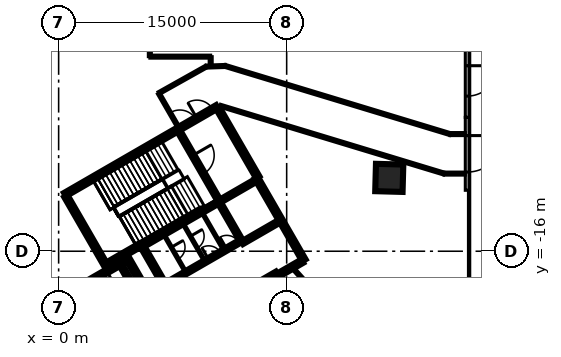
"""IFC4 building model, lengths in metres.
Left out: names, types, materials, properties, quantities, classifications, styles, units other than length and angle.
Written with IfcOpenShell. Run it as: python <this file> out.ifc"""

import sys

from ifc_helpers import new_model, si_unit, direction, frame, frame_2d, origin, origin_2d, place, context, subcontext, project, spatial, rectangle, extrude, element, fill, save


model = new_model("IFC4")
c1 = context("Model", 3, precision=1e-05, world=origin(), true_north=direction((0.0, 1.0)))
c2 = subcontext(c1, "Body", "Model", "MODEL_VIEW")
j1 = project(units=[si_unit("LENGTHUNIT", "METRE"), si_unit("PLANEANGLEUNIT", "RADIAN")], contexts=[c1])
p1 = place(None, origin())
s1 = spatial("IfcSite", under=j1, at=p1, CompositionType="ELEMENT")
p2 = place(p1, origin())
s2 = spatial("IfcBuilding", under=s1, at=p2, CompositionType="ELEMENT")
p3 = place(p2, origin())
s3 = spatial("IfcBuildingStorey", under=s2, at=p3, CompositionType="ELEMENT", Elevation=0.0)
p4 = place(p3, frame((21.749, -11.174, -0.45), z_axis=(0.0, 0.0, 1.0), x_axis=(-0.999628128016, 0.02726913418, 0.0)))
e1 = element("IfcColumn", 1, at=p4, inside=s3, PredefinedType="COLUMN", context=c2, shape_type="SweptSolid", body=[
    extrude(rectangle(XDim=1.8, YDim=1.8, at=origin_2d()), origin(), (0.0, 0.0, 1.0), 5.15),
])
p5 = place(p3, frame((26.875, -7.195, 0.0), z_axis=(0.0, 0.0, 1.0), x_axis=(0.0, -1.0, 0.0)))
e2 = element("IfcWall", 2, at=p5, inside=s3, PredefinedType="SOLIDWALL", context=c2, shape_type="SweptSolid", body=[
    extrude(rectangle(XDim=4.797, YDim=0.25, at=frame_2d((2.398, 0.0))), origin(), (0.0, 0.0, 1.0), 7.1),
])
p6 = place(p5, frame((1.198, 0.0, 0.0)))
e3 = element("IfcOpeningElement", 3, at=p6, cuts=e2, PredefinedType="OPENING", context=c2, shape_type="SweptSolid", body=[
    extrude(rectangle(XDim=2.4, YDim=2.4, at=frame_2d((1.2, 1.2))), frame((0.0, 0.135, 0.0), z_axis=(0.0, -1.0, 0.0), x_axis=(1.0, 0.0, 0.0)), (0.0, 0.0, 1.0), 0.27),
])
p7 = place(p3, frame((26.875, -2.398, 0.0), z_axis=(0.0, 0.0, 1.0), x_axis=(0.0, -1.0, 0.0)))
e4 = element("IfcWall", 4, at=p7, inside=s3, PredefinedType="SOLIDWALL", context=c2, shape_type="SweptSolid", body=[
    extrude(rectangle(XDim=4.796, YDim=0.25, at=frame_2d((2.398, 0.0))), origin(), (0.0, 0.0, 1.0), 7.1),
])
p8 = place(p7, frame((1.398, 0.0, 0.0)))
e5 = element("IfcOpeningElement", 5, at=p8, cuts=e4, PredefinedType="OPENING", context=c2, shape_type="SweptSolid", body=[
    extrude(rectangle(XDim=2.0, YDim=2.7, at=frame_2d((1.0, 1.35))), frame((0.0, 0.135, 0.0), z_axis=(0.0, -1.0, 0.0), x_axis=(1.0, 0.0, 0.0)), (0.0, 0.0, 1.0), 0.27),
])
p9 = place(p3, frame((0.417, -12.273, 0.0), z_axis=(0.0, 0.0, 1.0), x_axis=(0.866021906294, 0.500006057782, 0.0)))
e6 = element("IfcWall", 6, at=p9, inside=s3, PredefinedType="SHEAR", context=c2, shape_type="SweptSolid", body=[
    extrude(rectangle(XDim=11.55, YDim=0.25, at=frame_2d((5.775, 0.0))), origin(), (0.0, 0.0, 1.0), 7.1),
])
p10 = place(p9, frame((10.025, 0.0, 0.0)))
e7 = element("IfcOpeningElement", 7, at=p10, cuts=e6, PredefinedType="OPENING", context=c2, shape_type="SweptSolid", body=[
    extrude(rectangle(XDim=1.2, YDim=2.1, at=frame_2d((0.6, 1.05))), frame((0.0, 0.135, 0.0), z_axis=(0.0, -1.0, 0.0), x_axis=(1.0, 0.0, 0.0)), (0.0, 0.0, 1.0), 0.27),
])
p11 = place(p9, frame((8.725, 0.0, 0.0)))
e8 = element("IfcOpeningElement", 8, at=p11, cuts=e6, PredefinedType="OPENING", context=c2, shape_type="SweptSolid", body=[
    extrude(rectangle(XDim=1.2, YDim=2.1, at=frame_2d((0.6, 1.05))), frame((0.0, 0.135, 0.0), z_axis=(0.0, -1.0, 0.0), x_axis=(1.0, 0.0, 0.0)), (0.0, 0.0, 1.0), 0.27),
])
p12 = place(p3, frame((13.008, -11.181, 0.0), z_axis=(0.0, 0.0, 1.0), x_axis=(0.500004234368, -0.866022959057, 0.0)))
e9 = element("IfcWall", 9, at=p12, inside=s3, PredefinedType="SHEAR", context=c2, shape_type="SweptSolid", body=[
    extrude(rectangle(XDim=6.25, YDim=0.25, at=frame_2d((3.125, 0.0))), origin(), (0.0, 0.0, 1.0), 7.1),
])
p13 = place(p3, frame((3.235, -17.153, 0.0), z_axis=(0.0, 0.0, 1.0), x_axis=(-0.500008851346, 0.866020293397, 0.0)))
e10 = element("IfcWall", 10, at=p13, inside=s3, PredefinedType="SHEAR", context=c2, shape_type="SweptSolid", body=[
    extrude(rectangle(XDim=5.51, YDim=0.25, at=frame_2d((2.755, 0.0))), origin(), (0.0, 0.0, 1.0), 7.1),
])
p14 = place(p3, frame((10.483, -6.606, 0.0), z_axis=(0.0, 0.0, 1.0), x_axis=(0.49999885962, -0.866026062182, 0.0)))
e11 = element("IfcWall", 11, at=p14, inside=s3, PredefinedType="SHEAR", context=c2, shape_type="SweptSolid", body=[
    extrude(rectangle(XDim=5.225, YDim=0.25, at=frame_2d((2.612, 0.0))), origin(), (0.0, 0.0, 1.0), 7.1),
])
p15 = place(p3, frame((7.031, -18.327, 0.0), z_axis=(0.0, 0.0, 1.0), x_axis=(-0.499971222258, 0.866042017984, 0.0)))
e12 = element("IfcWall", 12, at=p15, inside=s3, PredefinedType="SHEAR", context=c2, shape_type="SweptSolid", body=[
    extrude(rectangle(XDim=3.2, YDim=0.25, at=frame_2d((1.6, 0.0))), origin(), (0.0, 0.0, 1.0), 7.1),
])
p16 = place(p3, frame((14.315, -17.644, 0.0), z_axis=(0.0, 0.0, 1.0), x_axis=(0.500023226632, -0.866011993467, 0.0)))
e13 = element("IfcWall", 13, at=p16, inside=s3, PredefinedType="SHEAR", context=c2, shape_type="SweptSolid", body=[
    extrude(rectangle(XDim=2.974, YDim=0.25, at=frame_2d((1.487, 0.0))), origin(), (0.0, 0.0, 1.0), 7.1),
])
p17 = place(p3, frame((1.669, -18.19, 0.0), z_axis=(0.0, 0.0, 1.0), x_axis=(0.866042235819, 0.499970844928, 0.0)))
e14 = element("IfcWall", 14, at=p17, inside=s3, PredefinedType="SHEAR", context=c2, shape_type="SweptSolid", body=[
    extrude(rectangle(XDim=2.865, YDim=0.25, at=frame_2d((1.432, 0.0))), origin(), (0.0, 0.0, 1.0), 7.1),
])
p18 = place(p3, frame((4.414, -16.276, 0.0), z_axis=(0.0, 0.0, 1.0), x_axis=(0.500003324108, -0.866023484601, 0.0)))
e15 = element("IfcWall", 15, at=p18, inside=s3, PredefinedType="SHEAR", context=c2, shape_type="SweptSolid", body=[
    extrude(rectangle(XDim=3.085, YDim=0.25, at=frame_2d((1.542, 0.0))), origin(), (0.0, 0.0, 1.0), 7.1),
])
p19 = place(p3, frame((5.322, -15.619, 0.0), z_axis=(0.0, 0.0, 1.0), x_axis=(-0.866026229868, -0.499998569178, 0.0)))
e16 = element("IfcWall", 16, at=p19, inside=s3, PredefinedType="SHEAR", context=c2, shape_type="SweptSolid", body=[
    extrude(rectangle(XDim=2.449, YDim=0.25, at=frame_2d((1.225, 0.0))), origin(), (0.0, 0.0, 1.0), 7.1),
])
p20 = place(p3, frame((16.025, -16.656, 0.0), z_axis=(0.0, 0.0, 1.0), x_axis=(-0.866016279763, -0.500015802937, 0.0)))
e17 = element("IfcWall", 17, at=p20, inside=s3, PredefinedType="SHEAR", context=c2, shape_type="SweptSolid", body=[
    extrude(rectangle(XDim=1.849, YDim=0.25, at=frame_2d((0.925, 0.0))), origin(), (0.0, 0.0, 1.0), 7.1),
])
p21 = place(p3, frame((4.145, -16.749, 0.0), z_axis=(0.0, 0.0, 1.0), x_axis=(0.866185586049, 0.49972245349, 0.0)))
e18 = element("IfcWall", 18, at=p21, inside=s3, PredefinedType="SHEAR", context=c2, shape_type="SweptSolid", body=[
    extrude(rectangle(XDim=0.344, YDim=0.25, at=frame_2d((0.172, 0.0))), origin(), (0.0, 0.0, 1.0), 7.1),
])
p22 = place(p3, frame((9.052, -20.48, 0.0), z_axis=(0.0, 0.0, 1.0), x_axis=(0.866030299012, 0.499991521122, 0.0)))
e19 = element("IfcWall", 19, at=p22, inside=s3, PredefinedType="SHEAR", context=c2, shape_type="SweptSolid", body=[
    extrude(rectangle(XDim=6.1, YDim=0.2, at=frame_2d((3.05, 0.0))), origin(), (0.0, 0.0, 1.0), 7.1),
])
p23 = place(p22, frame((1.0, 0.0, 0.0)))
e20 = element("IfcOpeningElement", 20, at=p23, cuts=e19, PredefinedType="OPENING", context=c2, shape_type="SweptSolid", body=[
    extrude(rectangle(XDim=1.2, YDim=2.1, at=frame_2d((0.6, 1.05))), frame((0.0, 0.11, 0.0), z_axis=(0.0, -1.0, 0.0), x_axis=(1.0, 0.0, 0.0)), (0.0, 0.0, 1.0), 0.22),
])
p24 = place(p22, frame((4.05, 0.0, 0.0)))
e21 = element("IfcOpeningElement", 21, at=p24, cuts=e19, PredefinedType="OPENING", context=c2, shape_type="SweptSolid", body=[
    extrude(rectangle(XDim=1.2, YDim=2.1, at=frame_2d((0.6, 1.05))), frame((0.0, 0.11, 0.0), z_axis=(0.0, -1.0, 0.0), x_axis=(1.0, 0.0, 0.0)), (0.0, 0.0, 1.0), 0.22),
])
p25 = place(p3, frame((10.538, -12.752, 0.0), z_axis=(0.0, 0.0, 1.0), x_axis=(-0.866038630372, -0.499977090179, 0.0)))
e22 = element("IfcWall", 22, at=p25, inside=s3, PredefinedType="SHEAR", context=c2, shape_type="SweptSolid", body=[
    extrude(rectangle(XDim=5.699, YDim=0.2, at=frame_2d((2.85, 0.0))), origin(), (0.0, 0.0, 1.0), 7.1),
])
p26 = place(p3, frame((7.077, -18.156, 0.0), z_axis=(0.0, 0.0, 1.0), x_axis=(0.866038630372, 0.499977090179, 0.0)))
e23 = element("IfcWall", 23, at=p26, inside=s3, PredefinedType="SHEAR", context=c2, shape_type="SweptSolid", body=[
    extrude(rectangle(XDim=5.699, YDim=0.2, at=frame_2d((2.85, 0.0))), origin(), (0.0, 0.0, 1.0), 7.1),
])
p27 = place(p26, frame((3.224, 0.0, 0.0)))
e24 = element("IfcOpeningElement", 24, at=p27, cuts=e23, PredefinedType="OPENING", context=c2, shape_type="SweptSolid", body=[
    extrude(rectangle(XDim=0.9, YDim=2.1, at=frame_2d((0.45, 1.05))), frame((0.0, 0.11, 0.0), z_axis=(0.0, -1.0, 0.0), x_axis=(1.0, 0.0, 0.0)), (0.0, 0.0, 1.0), 0.22),
])
p28 = place(p26, frame((4.599, 0.0, 0.0)))
e25 = element("IfcOpeningElement", 25, at=p28, cuts=e23, PredefinedType="OPENING", context=c2, shape_type="SweptSolid", body=[
    extrude(rectangle(XDim=0.9, YDim=2.1, at=frame_2d((0.45, 1.05))), frame((0.0, 0.11, 0.0), z_axis=(0.0, -1.0, 0.0), x_axis=(1.0, 0.0, 0.0)), (0.0, 0.0, 1.0), 0.22),
])
p29 = place(p3, frame((7.906, -8.094, 0.0), z_axis=(0.0, 0.0, 1.0), x_axis=(0.500024287448, -0.866011380966, 0.0)))
e26 = element("IfcWall", 26, at=p29, inside=s3, PredefinedType="SHEAR", context=c2, shape_type="SweptSolid", body=[
    extrude(rectangle(XDim=5.251, YDim=0.2, at=frame_2d((2.625, 0.0))), origin(), (0.0, 0.0, 1.0), 7.1),
])
p30 = place(p29, frame((1.849, 0.0, 0.0)))
e27 = element("IfcOpeningElement", 27, at=p30, cuts=e26, PredefinedType="OPENING", context=c2, shape_type="SweptSolid", body=[
    extrude(rectangle(XDim=1.4, YDim=2.1, at=frame_2d((0.7, 1.05))), frame((0.0, 0.11, 0.0), z_axis=(0.0, -1.0, 0.0), x_axis=(1.0, 0.0, 0.0)), (0.0, 0.0, 1.0), 0.22),
])
p31 = place(p3, frame((5.503, -19.352, 0.0), z_axis=(0.0, 0.0, 1.0), x_axis=(-0.499986818241, 0.866033014143, 0.0)))
e28 = element("IfcWall", 28, at=p31, inside=s3, PredefinedType="SHEAR", context=c2, shape_type="SweptSolid", body=[
    extrude(rectangle(XDim=2.798, YDim=0.2, at=frame_2d((1.399, 0.0))), origin(), (0.0, 0.0, 1.0), 7.1),
])
p32 = place(p31, frame((0.949, 0.0, 0.0)))
e29 = element("IfcOpeningElement", 29, at=p32, cuts=e28, PredefinedType="OPENING", context=c2, shape_type="SweptSolid", body=[
    extrude(rectangle(XDim=0.9, YDim=2.1, at=frame_2d((0.45, 1.05))), frame((0.0, 0.11, 0.0), z_axis=(0.0, -1.0, 0.0), x_axis=(1.0, 0.0, 0.0)), (0.0, 0.0, 1.0), 0.22),
])
p33 = place(p3, frame((11.963, -15.22, 0.0), z_axis=(0.0, 0.0, 1.0), x_axis=(-0.500034990121, 0.866005201286, 0.0)))
e30 = element("IfcWall", 30, at=p33, inside=s3, PredefinedType="SHEAR", context=c2, shape_type="SweptSolid", body=[
    extrude(rectangle(XDim=2.75, YDim=0.2, at=frame_2d((1.375, 0.0))), origin(), (0.0, 0.0, 1.0), 7.1),
])
p34 = place(p3, frame((10.587, -12.723, 0.0), z_axis=(0.0, 0.0, 1.0), x_axis=(0.866037306777, 0.499979382845, 0.0)))
e31 = element("IfcWall", 31, at=p34, inside=s3, PredefinedType="SHEAR", context=c2, shape_type="SweptSolid", body=[
    extrude(rectangle(XDim=2.742, YDim=0.2, at=frame_2d((1.371, 0.0))), origin(), (0.0, 0.0, 1.0), 7.1),
])
p35 = place(p34, frame((0.743, 0.0, 0.0)))
e32 = element("IfcOpeningElement", 32, at=p35, cuts=e31, PredefinedType="OPENING", context=c2, shape_type="SweptSolid", body=[
    extrude(rectangle(XDim=1.3, YDim=2.1, at=frame_2d((0.65, 1.05))), frame((0.0, 0.11, 0.0), z_axis=(0.0, -1.0, 0.0), x_axis=(1.0, 0.0, 0.0)), (0.0, 0.0, 1.0), 0.22),
])
p36 = place(p3, frame((14.512, -14.037, 0.0), z_axis=(0.0, 0.0, 1.0), x_axis=(-0.866044696403, -0.499966582715, 0.0)))
e33 = element("IfcWall", 33, at=p36, inside=s3, PredefinedType="SHEAR", context=c2, shape_type="SweptSolid", body=[
    extrude(rectangle(XDim=2.799, YDim=0.2, at=frame_2d((1.399, 0.0))), origin(), (0.0, 0.0, 1.0), 7.1),
])
p37 = place(p3, frame((8.207, -14.214, 0.0), z_axis=(0.0, 0.0, 1.0), x_axis=(0.50002746344, -0.86600954718, 0.0)))
e34 = element("IfcWall", 34, at=p37, inside=s3, PredefinedType="PARTITIONING", context=c2, shape_type="SweptSolid", body=[
    extrude(rectangle(XDim=2.748, YDim=0.15, at=frame_2d((1.374, 0.0))), origin(), (0.0, 0.0, 1.0), 7.1),
])
p38 = place(p37, frame((0.924, 0.0, 0.0)))
e35 = element("IfcOpeningElement", 35, at=p38, cuts=e34, PredefinedType="OPENING", context=c2, shape_type="SweptSolid", body=[
    extrude(rectangle(XDim=0.9, YDim=2.1, at=frame_2d((0.45, 1.05))), frame((0.0, 0.085, 0.0), z_axis=(0.0, -1.0, 0.0), x_axis=(1.0, 0.0, 0.0)), (0.0, 0.0, 1.0), 0.17),
])
p39 = place(p3, frame((9.462, -13.489, 0.0), z_axis=(0.0, 0.0, 1.0), x_axis=(0.499988999718, -0.866031754707, 0.0)))
e36 = element("IfcWall", 36, at=p39, inside=s3, PredefinedType="PARTITIONING", context=c2, shape_type="SweptSolid", body=[
    extrude(rectangle(XDim=2.749, YDim=0.15, at=frame_2d((1.374, 0.0))), origin(), (0.0, 0.0, 1.0), 7.1),
])
p40 = place(p3, frame((6.951, -14.939, 0.0), z_axis=(0.0, 0.0, 1.0), x_axis=(0.499988999718, -0.866031754707, 0.0)))
e37 = element("IfcWall", 37, at=p40, inside=s3, PredefinedType="PARTITIONING", context=c2, shape_type="SweptSolid", body=[
    extrude(rectangle(XDim=2.749, YDim=0.15, at=frame_2d((1.374, 0.0))), origin(), (0.0, 0.0, 1.0), 7.1),
])
p41 = place(p40, frame((0.924, 0.0, 0.0)))
e38 = element("IfcOpeningElement", 38, at=p41, cuts=e37, PredefinedType="OPENING", context=c2, shape_type="SweptSolid", body=[
    extrude(rectangle(XDim=0.9, YDim=2.1, at=frame_2d((0.45, 1.05))), frame((0.0, 0.085, 0.0), z_axis=(0.0, -1.0, 0.0), x_axis=(1.0, 0.0, 0.0)), (0.0, 0.0, 1.0), 0.17),
])
p42 = place(p3, frame((6.584, -5.605, 0.0), z_axis=(0.0, 0.0, 1.0), x_axis=(0.500037327496, -0.866003851672, 0.0)))
e39 = element("IfcWall", 39, at=p42, inside=s3, PredefinedType="PARTITIONING", context=c2, shape_type="SweptSolid", body=[
    extrude(rectangle(XDim=2.506, YDim=0.2, at=frame_2d((1.253, 0.0))), origin(), (0.0, 0.0, 1.0), 7.1),
])
p43 = place(p3, frame((6.584, -5.605, 0.0), z_axis=(0.0, 0.0, 1.0), x_axis=(0.872179971593, 0.489185135867, 0.0)))
e40 = element("IfcWall", 40, at=p43, inside=s3, PredefinedType="PARTITIONING", context=c2, shape_type="SweptSolid", body=[
    extrude(rectangle(XDim=3.577, YDim=0.2, at=frame_2d((1.789, 0.0))), origin(), (0.0, 0.0, 1.0), 7.1),
])
p44 = place(p3, frame((9.704, -3.855, 0.0), z_axis=(0.0, 0.0, 1.0), x_axis=(0.999442318284, 0.033392400689, 0.0)))
e41 = element("IfcWall", 41, at=p44, inside=s3, PredefinedType="PARTITIONING", context=c2, shape_type="SweptSolid", body=[
    extrude(rectangle(XDim=1.258, YDim=0.2, at=frame_2d((0.629, 0.0))), origin(), (0.0, 0.0, 1.0), 7.1),
])
p45 = place(p3, frame((10.617, -6.426, 0.0), z_axis=(0.0, 0.0, 1.0), x_axis=(0.957017605076, -0.290029832216, 0.0)))
e42 = element("IfcWall", 42, at=p45, inside=s3, PredefinedType="PARTITIONING", context=c2, shape_type="SweptSolid", body=[
    extrude(rectangle(XDim=15.402, YDim=0.2, at=frame_2d((7.701, 0.0))), origin(), (0.0, 0.0, 1.0), 4.7),
])
p46 = place(p3, frame((10.961, -3.813, 0.0), z_axis=(0.0, 0.0, 1.0), x_axis=(0.957013768883, -0.29004249028, 0.0)))
e43 = element("IfcWall", 43, at=p46, inside=s3, PredefinedType="PARTITIONING", context=c2, shape_type="SweptSolid", body=[
    extrude(rectangle(XDim=15.446, YDim=0.2, at=frame_2d((7.723, 0.0))), origin(), (0.0, 0.0, 1.0), 4.7),
])
p47 = place(p3, frame((25.357, -10.893, 0.0), z_axis=(0.0, 0.0, 1.0), x_axis=(1.0, 0.0, 0.0)))
e44 = element("IfcWall", 44, at=p47, inside=s3, PredefinedType="PARTITIONING", context=c2, shape_type="SweptSolid", body=[
    extrude(rectangle(XDim=1.393, YDim=0.2, at=frame_2d((0.697, 0.0))), origin(), (0.0, 0.0, 1.0), 7.1),
])
p48 = place(p3, frame((25.743, -8.293, 0.0), z_axis=(0.0, 0.0, 1.0), x_axis=(1.0, 0.0, 0.0)))
e45 = element("IfcWall", 45, at=p48, inside=s3, PredefinedType="PARTITIONING", context=c2, shape_type="SweptSolid", body=[
    extrude(rectangle(XDim=1.007, YDim=0.2, at=frame_2d((0.503, 0.0))), origin(), (0.0, 0.0, 1.0), 7.1),
])
p49 = place(p3, frame((6.0, -3.2, 0.0), z_axis=(0.0, 0.0, 1.0), x_axis=(0.0, 1.0, 0.0)))
e46 = element("IfcWall", 46, at=p49, inside=s3, PredefinedType="PARTITIONING", context=c2, shape_type="SweptSolid", body=[
    extrude(rectangle(XDim=11.7, YDim=0.2, at=frame_2d((5.85, 0.0))), origin(), (0.0, 0.0, 1.0), 6.2),
])
p50 = place(p49, frame((4.65, 0.0, 0.0)))
e47 = element("IfcOpeningElement", 47, at=p50, cuts=e46, PredefinedType="OPENING", context=c2, shape_type="SweptSolid", body=[
    extrude(rectangle(XDim=2.4, YDim=2.1, at=frame_2d((1.2, 1.05))), frame((0.0, 0.11, 0.0), z_axis=(0.0, -1.0, 0.0), x_axis=(1.0, 0.0, 0.0)), (0.0, 0.0, 1.0), 0.22),
])
p51 = place(p3, frame((6.0, -3.2, 0.0), z_axis=(0.0, 0.0, 1.0), x_axis=(1.0, 0.0, 0.0)))
e48 = element("IfcWall", 48, at=p51, inside=s3, PredefinedType="PARTITIONING", context=c2, shape_type="SweptSolid", body=[
    extrude(rectangle(XDim=4.0, YDim=0.2, at=frame_2d((2.0, 0.0))), origin(), (0.0, 0.0, 1.0), 7.1),
])
p52 = place(p3, frame((10.002, -3.843, 0.0), z_axis=(0.0, 0.0, 1.0), x_axis=(0.0, 1.0, 0.0)))
e49 = element("IfcWall", 49, at=p52, inside=s3, PredefinedType="PARTITIONING", context=c2, shape_type="SweptSolid", body=[
    extrude(rectangle(XDim=0.641, YDim=0.2, at=frame_2d((0.321, 0.0))), origin(), (0.0, 0.0, 1.0), 7.1),
])
p53 = place(p3, frame((15.475, -17.188, 0.0), z_axis=(0.0, 0.0, 1.0), x_axis=(0.669166821611, -0.74311221552, 0.0)))
e50 = element("IfcWall", 50, at=p53, inside=s3, PredefinedType="PARTITIONING", context=c2, shape_type="SweptSolid", body=[
    extrude(rectangle(XDim=17.218, YDim=0.2, at=frame_2d((8.609, 0.0))), origin(), (0.0, 0.0, 1.0), 4.7),
])
p54 = place(p53, frame((8.006, 0.0, 0.0)))
e51 = element("IfcOpeningElement", 51, at=p54, cuts=e50, PredefinedType="OPENING", context=c2, shape_type="SweptSolid", body=[
    extrude(rectangle(XDim=1.0, YDim=2.1, at=frame_2d((0.5, 1.05))), frame((0.0, 0.11, 0.0), z_axis=(0.0, -1.0, 0.0), x_axis=(1.0, 0.0, 0.0)), (0.0, 0.0, 1.0), 0.22),
])
p55 = place(p8, origin())
e52 = element("IfcDoor", 52, at=p55, inside=s3, OperationType="DOUBLE_DOOR_DOUBLE_SWING", PredefinedType="DOOR", context=c2, shape_type="SweptSolid", body=[
    extrude(rectangle(XDim=2.0, YDim=2.7, at=frame_2d((1.0, 1.35))), frame((0.0, 0.025, 0.0), z_axis=(0.0, -1.0, 0.0), x_axis=(1.0, 0.0, 0.0)), (0.0, 0.0, 1.0), 0.05),
])
fill(e5, e52)
p56 = place(p6, origin())
e53 = element("IfcDoor", 53, at=p56, inside=s3, OperationType="DOUBLE_DOOR_DOUBLE_SWING", PredefinedType="DOOR", context=c2, shape_type="SweptSolid", body=[
    extrude(rectangle(XDim=2.4, YDim=2.4, at=frame_2d((1.2, 1.2))), frame((0.0, 0.025, 0.0), z_axis=(0.0, -1.0, 0.0), x_axis=(1.0, 0.0, 0.0)), (0.0, 0.0, 1.0), 0.05),
])
fill(e3, e53)
p57 = place(p35, origin())
e54 = element("IfcDoor", 54, at=p57, inside=s3, OperationType="SLIDING_TO_RIGHT", PredefinedType="DOOR", context=c2, shape_type="SweptSolid", body=[
    extrude(rectangle(XDim=1.3, YDim=2.1, at=frame_2d((0.65, 1.05))), frame((0.0, 0.025, 0.0), z_axis=(0.0, -1.0, 0.0), x_axis=(1.0, 0.0, 0.0)), (0.0, 0.0, 1.0), 0.05),
])
fill(e32, e54)
p58 = place(p10, origin())
e55 = element("IfcDoor", 55, at=p58, inside=s3, OperationType="SINGLE_SWING_LEFT", PredefinedType="DOOR", context=c2, shape_type="SweptSolid", body=[
    extrude(rectangle(XDim=1.2, YDim=2.1, at=frame_2d((0.6, 1.05))), frame((0.0, 0.025, 0.0), z_axis=(0.0, -1.0, 0.0), x_axis=(1.0, 0.0, 0.0)), (0.0, 0.0, 1.0), 0.05),
])
fill(e7, e55)
p59 = place(p11, origin())
e56 = element("IfcDoor", 56, at=p59, inside=s3, OperationType="SINGLE_SWING_RIGHT", PredefinedType="DOOR", context=c2, shape_type="SweptSolid", body=[
    extrude(rectangle(XDim=1.2, YDim=2.1, at=frame_2d((0.6, 1.05))), frame((0.0, 0.025, 0.0), z_axis=(0.0, -1.0, 0.0), x_axis=(1.0, 0.0, 0.0)), (0.0, 0.0, 1.0), 0.05),
])
fill(e8, e56)
p60 = place(p30, origin())
e57 = element("IfcDoor", 57, at=p60, inside=s3, OperationType="SINGLE_SWING_RIGHT", PredefinedType="DOOR", context=c2, shape_type="SweptSolid", body=[
    extrude(rectangle(XDim=1.4, YDim=2.1, at=frame_2d((0.7, 1.05))), frame((0.0, 0.025, 0.0), z_axis=(0.0, -1.0, 0.0), x_axis=(1.0, 0.0, 0.0)), (0.0, 0.0, 1.0), 0.05),
])
fill(e27, e57)
p61 = place(p27, origin())
e58 = element("IfcDoor", 58, at=p61, inside=s3, OperationType="SINGLE_SWING_LEFT", PredefinedType="DOOR", context=c2, shape_type="SweptSolid", body=[
    extrude(rectangle(XDim=0.9, YDim=2.1, at=frame_2d((0.45, 1.05))), frame((0.0, 0.025, 0.0), z_axis=(0.0, -1.0, 0.0), x_axis=(1.0, 0.0, 0.0)), (0.0, 0.0, 1.0), 0.05),
])
fill(e24, e58)
p62 = place(p28, origin())
e59 = element("IfcDoor", 59, at=p62, inside=s3, OperationType="SINGLE_SWING_RIGHT", PredefinedType="DOOR", context=c2, shape_type="SweptSolid", body=[
    extrude(rectangle(XDim=0.9, YDim=2.1, at=frame_2d((0.45, 1.05))), frame((0.0, 0.025, 0.0), z_axis=(0.0, -1.0, 0.0), x_axis=(1.0, 0.0, 0.0)), (0.0, 0.0, 1.0), 0.05),
])
fill(e25, e59)
p63 = place(p38, origin())
e60 = element("IfcDoor", 60, at=p63, inside=s3, OperationType="SINGLE_SWING_RIGHT", PredefinedType="DOOR", context=c2, shape_type="SweptSolid", body=[
    extrude(rectangle(XDim=0.9, YDim=2.1, at=frame_2d((0.45, 1.05))), frame((0.0, 0.025, 0.0), z_axis=(0.0, -1.0, 0.0), x_axis=(1.0, 0.0, 0.0)), (0.0, 0.0, 1.0), 0.05),
])
fill(e35, e60)
p64 = place(p41, origin())
e61 = element("IfcDoor", 61, at=p64, inside=s3, OperationType="SINGLE_SWING_LEFT", PredefinedType="DOOR", context=c2, shape_type="SweptSolid", body=[
    extrude(rectangle(XDim=0.9, YDim=2.1, at=frame_2d((0.45, 1.05))), frame((0.0, 0.025, 0.0), z_axis=(0.0, -1.0, 0.0), x_axis=(1.0, 0.0, 0.0)), (0.0, 0.0, 1.0), 0.05),
])
fill(e38, e61)
save(model, sys.argv[1])
